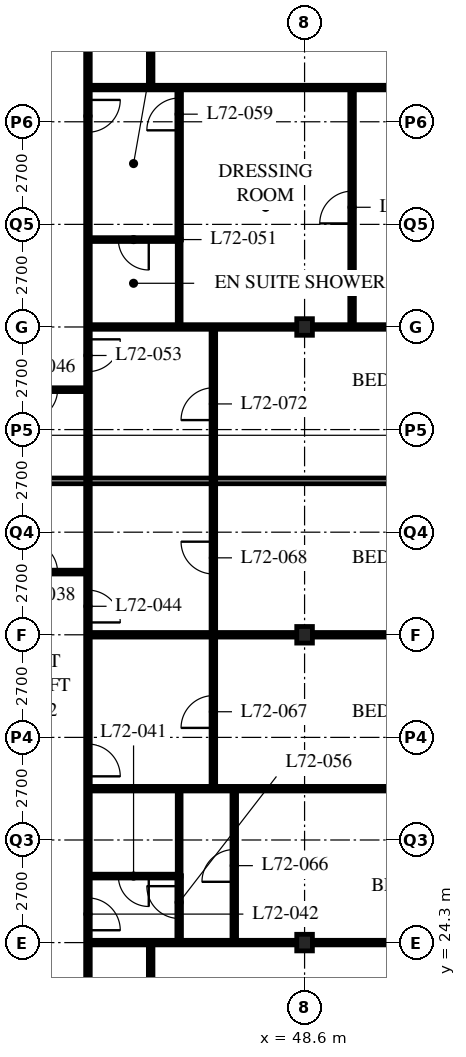
"""IFC4 building model, lengths in metres.
Left out: names, types, materials, properties, quantities, classifications, styles, units other than length and angle.
Written with IfcOpenShell. Run it as: python <this file> out.ifc"""

import sys

from ifc_helpers import new_model, si_unit, direction, frame, frame_2d, origin, origin_2d, place, context, subcontext, project, spatial, rectangle, i_section, extrude, element, fill, save


model = new_model("IFC4")
c1 = context("Model", 3, precision=1e-05, world=origin(), true_north=direction((0.0, 1.0)))
c2 = subcontext(c1, "Body", "Model", "MODEL_VIEW")
j1 = project(units=[si_unit("LENGTHUNIT", "METRE"), si_unit("PLANEANGLEUNIT", "RADIAN")], contexts=[c1])
p1 = place(None, origin())
s1 = spatial("IfcSite", under=j1, at=p1, CompositionType="ELEMENT")
p2 = place(p1, origin())
s2 = spatial("IfcBuilding", under=s1, at=p2, CompositionType="ELEMENT")
p3 = place(p2, frame((0.0, 0.0, 281.4)))
s3 = spatial("IfcBuildingStorey", under=s2, at=p3, CompositionType="ELEMENT", Elevation=281.4)
for number, where, z_axis, x_axis in (
    (1, (48.6, 24.3, 0.0), (0.0, 0.0, 1.0), (1.0, 0.0, 0.0)),
    (2, (48.6, 32.4, 0.0), (0.0, 0.0, 1.0), (1.0, 0.0, 0.0)),
    (3, (48.6, 40.5, 0.0), (0.0, 0.0, 1.0), (1.0, 0.0, 0.0)),
):
    element("IfcColumn", number, at=place(p3, frame(where, z_axis=z_axis, x_axis=x_axis)), inside=s3, PredefinedType="COLUMN", context=c2, shape_type="SweptSolid", body=[
        extrude(i_section(OverallWidth=0.412, OverallDepth=0.437, WebThickness=0.036, FlangeThickness=0.058, FilletRadius=0.015, at=origin_2d()), origin(), (0.0, 0.0, 1.0), 3.9),
    ])
p4 = place(p3, frame((40.5, 34.05, 0.0), z_axis=(0.0, 0.0, 1.0), x_axis=(1.0, 0.0, 0.0)))
e4 = element("IfcWall", 4, at=p4, inside=s3, PredefinedType="PARTITIONING", context=c2, shape_type="SweptSolid", body=[
    extrude(rectangle(XDim=2.4, YDim=0.1, at=frame_2d((1.2, 0.0))), origin(), (0.0, 0.0, 1.0), 3.69),
])
p5 = place(p4, frame((0.8, 0.0, 0.0)))
e5 = element("IfcOpeningElement", 5, at=p5, cuts=e4, PredefinedType="OPENING", context=c2, shape_type="SweptSolid", body=[
    extrude(rectangle(XDim=0.8, YDim=2.1, at=frame_2d((0.4, 1.05))), frame((0.0, 0.06, 0.0), z_axis=(0.0, -1.0, 0.0), x_axis=(1.0, 0.0, 0.0)), (0.0, 0.0, 1.0), 0.12),
])
p6 = place(p3, frame((42.9, 22.5, 0.0), z_axis=(0.0, 0.0, 1.0), x_axis=(0.0, 1.0, 0.0)))
e6 = element("IfcWall", 6, at=p6, inside=s3, PredefinedType="PARTITIONING", context=c2, shape_type="SweptSolid", body=[
    extrude(rectangle(XDim=13.95, YDim=0.12, at=frame_2d((6.975, 0.0))), origin(), (0.0, 0.0, 1.0), 3.69),
])
p7 = place(p6, frame((2.125, 0.0, 0.0)))
e7 = element("IfcOpeningElement", 7, at=p7, cuts=e6, PredefinedType="OPENING", context=c2, shape_type="SweptSolid", body=[
    extrude(rectangle(XDim=0.85, YDim=2.1, at=frame_2d((0.425, 1.05))), frame((0.0, 0.07, 0.0), z_axis=(0.0, -1.0, 0.0), x_axis=(1.0, 0.0, 0.0)), (0.0, 0.0, 1.0), 0.14),
])
p8 = place(p6, frame((6.175, 0.0, 0.0)))
e8 = element("IfcOpeningElement", 8, at=p8, cuts=e6, PredefinedType="OPENING", context=c2, shape_type="SweptSolid", body=[
    extrude(rectangle(XDim=0.85, YDim=2.1, at=frame_2d((0.425, 1.05))), frame((0.0, 0.07, 0.0), z_axis=(0.0, -1.0, 0.0), x_axis=(1.0, 0.0, 0.0)), (0.0, 0.0, 1.0), 0.14),
])
p9 = place(p6, frame((10.225, 0.0, 0.0)))
e9 = element("IfcOpeningElement", 9, at=p9, cuts=e6, PredefinedType="OPENING", context=c2, shape_type="SweptSolid", body=[
    extrude(rectangle(XDim=0.85, YDim=2.1, at=frame_2d((0.425, 1.05))), frame((0.0, 0.07, 0.0), z_axis=(0.0, -1.0, 0.0), x_axis=(1.0, 0.0, 0.0)), (0.0, 0.0, 1.0), 0.14),
])
p10 = place(p3, frame((42.9, 24.3, 0.0), z_axis=(0.0, 0.0, 1.0), x_axis=(1.0, 0.0, 0.0)))
e10 = element("IfcWall", 10, at=p10, inside=s3, PredefinedType="PARTITIONING", context=c2, shape_type="SweptSolid", body=[
    extrude(rectangle(XDim=9.45, YDim=0.12, at=frame_2d((4.725, 0.0))), origin(), (0.0, 0.0, 1.0), 3.078),
])
p11 = place(p3, frame((40.5, 36.45, 0.0), z_axis=(0.0, 0.0, 1.0), x_axis=(1.0, 0.0, 0.0)))
e11 = element("IfcWall", 11, at=p11, inside=s3, PredefinedType="PARTITIONING", context=c2, shape_type="SweptSolid", body=[
    extrude(rectangle(XDim=15.9, YDim=0.15, at=frame_2d((7.95, 0.0))), origin(), (0.0, 0.0, 1.0), 3.69),
])
p12 = place(p3, frame((44.55, 16.5, 0.0), z_axis=(0.0, 0.0, 1.0), x_axis=(0.0, 1.0, 0.0)))
e12 = element("IfcWall", 12, at=p12, inside=s3, PredefinedType="PARTITIONING", context=c2, shape_type="SweptSolid", body=[
    extrude(rectangle(XDim=7.8, YDim=0.12, at=frame_2d((3.9, 0.0))), origin(), (0.0, 0.0, 1.0), 3.69),
])
p13 = place(p12, frame((3.475, 0.0, 0.0)))
e13 = element("IfcOpeningElement", 13, at=p13, cuts=e12, PredefinedType="OPENING", context=c2, shape_type="SweptSolid", body=[
    extrude(rectangle(XDim=0.85, YDim=2.1, at=frame_2d((0.425, 1.05))), frame((0.0, 0.07, 0.0), z_axis=(0.0, -1.0, 0.0), x_axis=(1.0, 0.0, 0.0)), (0.0, 0.0, 1.0), 0.14),
])
p14 = place(p3, frame((42.9, 26.05, 0.0), z_axis=(0.0, 0.0, 1.0), x_axis=(1.0, 0.0, 0.0)))
e14 = element("IfcWall", 14, at=p14, inside=s3, PredefinedType="PARTITIONING", context=c2, shape_type="SweptSolid", body=[
    extrude(rectangle(XDim=2.4, YDim=0.1, at=frame_2d((1.2, 0.0))), origin(), (0.0, 0.0, 1.0), 3.69),
])
p15 = place(p14, frame((0.8, 0.0, 0.0)))
e15 = element("IfcOpeningElement", 15, at=p15, cuts=e14, PredefinedType="OPENING", context=c2, shape_type="SweptSolid", body=[
    extrude(rectangle(XDim=0.8, YDim=2.1, at=frame_2d((0.4, 1.05))), frame((0.0, 0.06, 0.0), z_axis=(0.0, -1.0, 0.0), x_axis=(1.0, 0.0, 0.0)), (0.0, 0.0, 1.0), 0.12),
])
p16 = place(p3, frame((45.3, 26.05, 0.0), z_axis=(0.0, 0.0, 1.0), x_axis=(0.0, 1.0, 0.0)))
e16 = element("IfcWall", 16, at=p16, inside=s3, PredefinedType="PARTITIONING", context=c2, shape_type="SweptSolid", body=[
    extrude(rectangle(XDim=2.3, YDim=0.1, at=frame_2d((1.15, 0.0))), origin(), (0.0, 0.0, 1.0), 3.69),
])
p17 = place(p3, frame((42.9, 28.35, 0.0), z_axis=(0.0, 0.0, 1.0), x_axis=(1.0, 0.0, 0.0)))
e17 = element("IfcWall", 17, at=p17, inside=s3, PredefinedType="PARTITIONING", context=c2, shape_type="SweptSolid", body=[
    extrude(rectangle(XDim=13.5, YDim=0.12, at=frame_2d((6.75, 0.0))), origin(), (0.0, 0.0, 1.0), 3.69),
])
p18 = place(p3, frame((42.9, 32.4, 0.0), z_axis=(0.0, 0.0, 1.0), x_axis=(1.0, 0.0, 0.0)))
e18 = element("IfcWall", 18, at=p18, inside=s3, PredefinedType="PARTITIONING", context=c2, shape_type="SweptSolid", body=[
    extrude(rectangle(XDim=13.5, YDim=0.12, at=frame_2d((6.75, 0.0))), origin(), (0.0, 0.0, 1.0), 3.078),
])
p19 = place(p3, frame((40.5, 38.85, 0.0), z_axis=(0.0, 0.0, 1.0), x_axis=(1.0, 0.0, 0.0)))
e19 = element("IfcWall", 19, at=p19, inside=s3, PredefinedType="PARTITIONING", context=c2, shape_type="SweptSolid", body=[
    extrude(rectangle(XDim=2.4, YDim=0.1, at=frame_2d((1.2, 0.0))), origin(), (0.0, 0.0, 1.0), 3.69),
])
p20 = place(p19, frame((0.8, 0.0, 0.0)))
e20 = element("IfcOpeningElement", 20, at=p20, cuts=e19, PredefinedType="OPENING", context=c2, shape_type="SweptSolid", body=[
    extrude(rectangle(XDim=0.8, YDim=2.1, at=frame_2d((0.4, 1.05))), frame((0.0, 0.06, 0.0), z_axis=(0.0, -1.0, 0.0), x_axis=(1.0, 0.0, 0.0)), (0.0, 0.0, 1.0), 0.12),
])
p21 = place(p3, frame((42.9, 48.6, 0.0), z_axis=(0.0, 0.0, 1.0), x_axis=(0.0, -1.0, 0.0)))
e21 = element("IfcWall", 21, at=p21, inside=s3, PredefinedType="PARTITIONING", context=c2, shape_type="SweptSolid", body=[
    extrude(rectangle(XDim=12.15, YDim=0.12, at=frame_2d((6.075, 0.0))), origin(), (0.0, 0.0, 1.0), 3.69),
])
p22 = place(p21, frame((2.125, 0.0, 0.0)))
e22 = element("IfcOpeningElement", 22, at=p22, cuts=e21, PredefinedType="OPENING", context=c2, shape_type="SweptSolid", body=[
    extrude(rectangle(XDim=0.85, YDim=2.1, at=frame_2d((0.425, 1.05))), frame((0.0, 0.07, 0.0), z_axis=(0.0, -1.0, 0.0), x_axis=(1.0, 0.0, 0.0)), (0.0, 0.0, 1.0), 0.14),
])
p23 = place(p21, frame((8.425, 0.0, 0.0)))
e23 = element("IfcOpeningElement", 23, at=p23, cuts=e21, PredefinedType="OPENING", context=c2, shape_type="SweptSolid", body=[
    extrude(rectangle(XDim=0.85, YDim=2.1, at=frame_2d((0.425, 1.05))), frame((0.0, 0.07, 0.0), z_axis=(0.0, -1.0, 0.0), x_axis=(1.0, 0.0, 0.0)), (0.0, 0.0, 1.0), 0.14),
])
p24 = place(p3, frame((42.9, 46.8, 0.0), z_axis=(0.0, 0.0, 1.0), x_axis=(1.0, 0.0, 0.0)))
e24 = element("IfcWall", 24, at=p24, inside=s3, PredefinedType="PARTITIONING", context=c2, shape_type="SweptSolid", body=[
    extrude(rectangle(XDim=13.5, YDim=0.12, at=frame_2d((6.75, 0.0))), origin(), (0.0, 0.0, 1.0), 3.69),
])
p25 = place(p3, frame((44.55, 64.5, 0.0), z_axis=(0.0, 0.0, 1.0), x_axis=(0.0, -1.0, 0.0)))
e25 = element("IfcWall", 25, at=p25, inside=s3, PredefinedType="PARTITIONING", context=c2, shape_type="SweptSolid", body=[
    extrude(rectangle(XDim=17.7, YDim=0.12, at=frame_2d((8.85, 0.0))), origin(), (0.0, 0.0, 1.0), 3.69),
])
p26 = place(p25, frame((12.475, 0.0, 0.0)))
e26 = element("IfcOpeningElement", 26, at=p26, cuts=e25, PredefinedType="OPENING", context=c2, shape_type="SweptSolid", body=[
    extrude(rectangle(XDim=0.85, YDim=2.1, at=frame_2d((0.425, 1.05))), frame((0.0, 0.07, 0.0), z_axis=(0.0, -1.0, 0.0), x_axis=(1.0, 0.0, 0.0)), (0.0, 0.0, 1.0), 0.14),
])
p27 = place(p25, frame((4.525, 0.0, 0.0)))
e27 = element("IfcOpeningElement", 27, at=p27, cuts=e25, PredefinedType="OPENING", context=c2, shape_type="SweptSolid", body=[
    extrude(rectangle(XDim=0.85, YDim=2.1, at=frame_2d((0.425, 1.05))), frame((0.0, 0.07, 0.0), z_axis=(0.0, -1.0, 0.0), x_axis=(1.0, 0.0, 0.0)), (0.0, 0.0, 1.0), 0.14),
])
p28 = place(p3, frame((42.9, 42.8, 0.0), z_axis=(0.0, 0.0, 1.0), x_axis=(1.0, 0.0, 0.0)))
e28 = element("IfcWall", 28, at=p28, inside=s3, PredefinedType="PARTITIONING", context=c2, shape_type="SweptSolid", body=[
    extrude(rectangle(XDim=2.4, YDim=0.1, at=frame_2d((1.2, 0.0))), origin(), (0.0, 0.0, 1.0), 3.69),
])
p29 = place(p28, frame((0.8, 0.0, 0.0)))
e29 = element("IfcOpeningElement", 29, at=p29, cuts=e28, PredefinedType="OPENING", context=c2, shape_type="SweptSolid", body=[
    extrude(rectangle(XDim=0.8, YDim=2.1, at=frame_2d((0.4, 1.05))), frame((0.0, 0.06, 0.0), z_axis=(0.0, -1.0, 0.0), x_axis=(1.0, 0.0, 0.0)), (0.0, 0.0, 1.0), 0.12),
])
p30 = place(p3, frame((45.3, 42.8, 0.0), z_axis=(0.0, 0.0, 1.0), x_axis=(0.0, -1.0, 0.0)))
e30 = element("IfcWall", 30, at=p30, inside=s3, PredefinedType="PARTITIONING", context=c2, shape_type="SweptSolid", body=[
    extrude(rectangle(XDim=2.3, YDim=0.1, at=frame_2d((1.15, 0.0))), origin(), (0.0, 0.0, 1.0), 3.69),
])
p31 = place(p3, frame((42.9, 40.5, 0.0), z_axis=(0.0, 0.0, 1.0), x_axis=(1.0, 0.0, 0.0)))
e31 = element("IfcWall", 31, at=p31, inside=s3, PredefinedType="PARTITIONING", context=c2, shape_type="SweptSolid", body=[
    extrude(rectangle(XDim=13.5, YDim=0.12, at=frame_2d((6.75, 0.0))), origin(), (0.0, 0.0, 1.0), 3.078),
])
p32 = place(p3, frame((45.3, 24.3, 0.0), z_axis=(0.0, 0.0, 1.0), x_axis=(0.0, 1.0, 0.0)))
e32 = element("IfcWall", 32, at=p32, inside=s3, PredefinedType="PARTITIONING", context=c2, shape_type="SweptSolid", body=[
    extrude(rectangle(XDim=1.76, YDim=0.12, at=frame_2d((0.88, 0.0))), origin(), (0.0, 0.0, 1.0), 3.69),
])
p33 = place(p32, frame((0.635, 0.0, 0.0)))
e33 = element("IfcOpeningElement", 33, at=p33, cuts=e32, PredefinedType="OPENING", context=c2, shape_type="SweptSolid", body=[
    extrude(rectangle(XDim=0.85, YDim=2.1, at=frame_2d((0.425, 1.05))), frame((0.0, 0.07, 0.0), z_axis=(0.0, -1.0, 0.0), x_axis=(1.0, 0.0, 0.0)), (0.0, 0.0, 1.0), 0.14),
])
p34 = place(p3, frame((45.3, 46.8, 0.0), z_axis=(0.0, 0.0, 1.0), x_axis=(0.0, -1.0, 0.0)))
e34 = element("IfcWall", 34, at=p34, inside=s3, PredefinedType="PARTITIONING", context=c2, shape_type="SweptSolid", body=[
    extrude(rectangle(XDim=4.01, YDim=0.12, at=frame_2d((2.005, 0.0))), origin(), (0.0, 0.0, 1.0), 3.69),
])
p35 = place(p34, frame((0.275, 0.0, 0.0)))
e35 = element("IfcOpeningElement", 35, at=p35, cuts=e34, PredefinedType="OPENING", context=c2, shape_type="SweptSolid", body=[
    extrude(rectangle(XDim=0.85, YDim=2.1, at=frame_2d((0.425, 1.05))), frame((0.0, 0.07, 0.0), z_axis=(0.0, -1.0, 0.0), x_axis=(1.0, 0.0, 0.0)), (0.0, 0.0, 1.0), 0.14),
])
p36 = place(p3, frame((46.75, 24.3, 0.0), z_axis=(0.0, 0.0, 1.0), x_axis=(0.0, 1.0, 0.0)))
e36 = element("IfcWall", 36, at=p36, inside=s3, PredefinedType="PARTITIONING", context=c2, shape_type="SweptSolid", body=[
    extrude(rectangle(XDim=4.05, YDim=0.12, at=frame_2d((2.025, 0.0))), origin(), (0.0, 0.0, 1.0), 3.69),
])
p37 = place(p36, frame((1.6, 0.0, 0.0)))
e37 = element("IfcOpeningElement", 37, at=p37, cuts=e36, PredefinedType="OPENING", context=c2, shape_type="SweptSolid", body=[
    extrude(rectangle(XDim=0.85, YDim=2.1, at=frame_2d((0.425, 1.05))), frame((0.0, 0.07, 0.0), z_axis=(0.0, -1.0, 0.0), x_axis=(1.0, 0.0, 0.0)), (0.0, 0.0, 1.0), 0.14),
])
p38 = place(p3, frame((46.2, 28.35, 0.0), z_axis=(0.0, 0.0, 1.0), x_axis=(0.0, 1.0, 0.0)))
e38 = element("IfcWall", 38, at=p38, inside=s3, PredefinedType="PARTITIONING", context=c2, shape_type="SweptSolid", body=[
    extrude(rectangle(XDim=12.15, YDim=0.12, at=frame_2d((6.075, 0.0))), origin(), (0.0, 0.0, 1.0), 3.69),
])
p39 = place(p38, frame((1.6, 0.0, 0.0)))
e39 = element("IfcOpeningElement", 39, at=p39, cuts=e38, PredefinedType="OPENING", context=c2, shape_type="SweptSolid", body=[
    extrude(rectangle(XDim=0.85, YDim=2.1, at=frame_2d((0.425, 1.05))), frame((0.0, 0.07, 0.0), z_axis=(0.0, -1.0, 0.0), x_axis=(1.0, 0.0, 0.0)), (0.0, 0.0, 1.0), 0.14),
])
p40 = place(p38, frame((5.65, 0.0, 0.0)))
e40 = element("IfcOpeningElement", 40, at=p40, cuts=e38, PredefinedType="OPENING", context=c2, shape_type="SweptSolid", body=[
    extrude(rectangle(XDim=0.85, YDim=2.1, at=frame_2d((0.425, 1.05))), frame((0.0, 0.07, 0.0), z_axis=(0.0, -1.0, 0.0), x_axis=(1.0, 0.0, 0.0)), (0.0, 0.0, 1.0), 0.14),
])
p41 = place(p38, frame((9.7, 0.0, 0.0)))
e41 = element("IfcOpeningElement", 41, at=p41, cuts=e38, PredefinedType="OPENING", context=c2, shape_type="SweptSolid", body=[
    extrude(rectangle(XDim=0.85, YDim=2.1, at=frame_2d((0.425, 1.05))), frame((0.0, 0.07, 0.0), z_axis=(0.0, -1.0, 0.0), x_axis=(1.0, 0.0, 0.0)), (0.0, 0.0, 1.0), 0.14),
])
p42 = place(p3, frame((49.85, 40.5, 0.0), z_axis=(0.0, 0.0, 1.0), x_axis=(0.0, 1.0, 0.0)))
e42 = element("IfcWall", 42, at=p42, inside=s3, PredefinedType="PARTITIONING", context=c2, shape_type="SweptSolid", body=[
    extrude(rectangle(XDim=6.3, YDim=0.12, at=frame_2d((3.15, 0.0))), origin(), (0.0, 0.0, 1.0), 3.69),
])
p43 = place(p42, frame((2.725, 0.0, 0.0)))
e43 = element("IfcOpeningElement", 43, at=p43, cuts=e42, PredefinedType="OPENING", context=c2, shape_type="SweptSolid", body=[
    extrude(rectangle(XDim=0.85, YDim=2.1, at=frame_2d((0.425, 1.05))), frame((0.0, 0.07, 0.0), z_axis=(0.0, -1.0, 0.0), x_axis=(1.0, 0.0, 0.0)), (0.0, 0.0, 1.0), 0.14),
])
p44 = place(p5, origin())
e44 = element("IfcDoor", 44, at=p44, inside=s3, OperationType="SINGLE_SWING_LEFT", PredefinedType="DOOR", context=c2, shape_type="SweptSolid", body=[
    extrude(rectangle(XDim=0.8, YDim=2.1, at=frame_2d((0.4, 1.05))), frame((0.0, 0.025, 0.0), z_axis=(0.0, -1.0, 0.0), x_axis=(1.0, 0.0, 0.0)), (0.0, 0.0, 1.0), 0.05),
])
fill(e5, e44)
p45 = place(p15, origin())
e45 = element("IfcDoor", 45, at=p45, inside=s3, OperationType="SINGLE_SWING_LEFT", PredefinedType="DOOR", context=c2, shape_type="SweptSolid", body=[
    extrude(rectangle(XDim=0.8, YDim=2.1, at=frame_2d((0.4, 1.05))), frame((0.0, 0.025, 0.0), z_axis=(0.0, -1.0, 0.0), x_axis=(1.0, 0.0, 0.0)), (0.0, 0.0, 1.0), 0.05),
])
fill(e15, e45)
p46 = place(p7, origin())
e46 = element("IfcDoor", 46, at=p46, inside=s3, OperationType="SINGLE_SWING_RIGHT", PredefinedType="DOOR", context=c2, shape_type="SweptSolid", body=[
    extrude(rectangle(XDim=0.85, YDim=2.1, at=frame_2d((0.425, 1.05))), frame((0.0, 0.025, 0.0), z_axis=(0.0, -1.0, 0.0), x_axis=(1.0, 0.0, 0.0)), (0.0, 0.0, 1.0), 0.05),
])
fill(e7, e46)
p47 = place(p8, origin())
e47 = element("IfcDoor", 47, at=p47, inside=s3, OperationType="SINGLE_SWING_RIGHT", PredefinedType="DOOR", context=c2, shape_type="SweptSolid", body=[
    extrude(rectangle(XDim=0.85, YDim=2.1, at=frame_2d((0.425, 1.05))), frame((0.0, 0.025, 0.0), z_axis=(0.0, -1.0, 0.0), x_axis=(1.0, 0.0, 0.0)), (0.0, 0.0, 1.0), 0.05),
])
fill(e8, e47)
p48 = place(p9, origin())
e48 = element("IfcDoor", 48, at=p48, inside=s3, OperationType="SINGLE_SWING_RIGHT", PredefinedType="DOOR", context=c2, shape_type="SweptSolid", body=[
    extrude(rectangle(XDim=0.85, YDim=2.1, at=frame_2d((0.425, 1.05))), frame((0.0, 0.025, 0.0), z_axis=(0.0, -1.0, 0.0), x_axis=(1.0, 0.0, 0.0)), (0.0, 0.0, 1.0), 0.05),
])
fill(e9, e48)
p49 = place(p20, origin())
e49 = element("IfcDoor", 49, at=p49, inside=s3, OperationType="SINGLE_SWING_RIGHT", PredefinedType="DOOR", context=c2, shape_type="SweptSolid", body=[
    extrude(rectangle(XDim=0.8, YDim=2.1, at=frame_2d((0.4, 1.05))), frame((0.0, 0.025, 0.0), z_axis=(0.0, -1.0, 0.0), x_axis=(1.0, 0.0, 0.0)), (0.0, 0.0, 1.0), 0.05),
])
fill(e20, e49)
p50 = place(p29, origin())
e50 = element("IfcDoor", 50, at=p50, inside=s3, OperationType="SINGLE_SWING_LEFT", PredefinedType="DOOR", context=c2, shape_type="SweptSolid", body=[
    extrude(rectangle(XDim=0.8, YDim=2.1, at=frame_2d((0.4, 1.05))), frame((0.0, 0.025, 0.0), z_axis=(0.0, -1.0, 0.0), x_axis=(1.0, 0.0, 0.0)), (0.0, 0.0, 1.0), 0.05),
])
fill(e29, e50)
p51 = place(p22, origin())
e51 = element("IfcDoor", 51, at=p51, inside=s3, OperationType="SINGLE_SWING_LEFT", PredefinedType="DOOR", context=c2, shape_type="SweptSolid", body=[
    extrude(rectangle(XDim=0.85, YDim=2.1, at=frame_2d((0.425, 1.05))), frame((0.0, 0.025, 0.0), z_axis=(0.0, -1.0, 0.0), x_axis=(1.0, 0.0, 0.0)), (0.0, 0.0, 1.0), 0.05),
])
fill(e22, e51)
p52 = place(p23, origin())
e52 = element("IfcDoor", 52, at=p52, inside=s3, OperationType="SINGLE_SWING_LEFT", PredefinedType="DOOR", context=c2, shape_type="SweptSolid", body=[
    extrude(rectangle(XDim=0.85, YDim=2.1, at=frame_2d((0.425, 1.05))), frame((0.0, 0.025, 0.0), z_axis=(0.0, -1.0, 0.0), x_axis=(1.0, 0.0, 0.0)), (0.0, 0.0, 1.0), 0.05),
])
fill(e23, e52)
p53 = place(p33, origin())
e53 = element("IfcDoor", 53, at=p53, inside=s3, OperationType="SINGLE_SWING_RIGHT", PredefinedType="DOOR", context=c2, shape_type="SweptSolid", body=[
    extrude(rectangle(XDim=0.85, YDim=2.1, at=frame_2d((0.425, 1.05))), frame((0.0, 0.025, 0.0), z_axis=(0.0, -1.0, 0.0), x_axis=(1.0, 0.0, 0.0)), (0.0, 0.0, 1.0), 0.05),
])
fill(e33, e53)
p54 = place(p35, origin())
e54 = element("IfcDoor", 54, at=p54, inside=s3, OperationType="SINGLE_SWING_LEFT", PredefinedType="DOOR", context=c2, shape_type="SweptSolid", body=[
    extrude(rectangle(XDim=0.85, YDim=2.1, at=frame_2d((0.425, 1.05))), frame((0.0, 0.025, 0.0), z_axis=(0.0, -1.0, 0.0), x_axis=(1.0, 0.0, 0.0)), (0.0, 0.0, 1.0), 0.05),
])
fill(e35, e54)
p55 = place(p37, origin())
e55 = element("IfcDoor", 55, at=p55, inside=s3, OperationType="SINGLE_SWING_LEFT", PredefinedType="DOOR", context=c2, shape_type="SweptSolid", body=[
    extrude(rectangle(XDim=0.85, YDim=2.1, at=frame_2d((0.425, 1.05))), frame((0.0, 0.025, 0.0), z_axis=(0.0, -1.0, 0.0), x_axis=(1.0, 0.0, 0.0)), (0.0, 0.0, 1.0), 0.05),
])
fill(e37, e55)
p56 = place(p39, origin())
e56 = element("IfcDoor", 56, at=p56, inside=s3, OperationType="SINGLE_SWING_LEFT", PredefinedType="DOOR", context=c2, shape_type="SweptSolid", body=[
    extrude(rectangle(XDim=0.85, YDim=2.1, at=frame_2d((0.425, 1.05))), frame((0.0, 0.025, 0.0), z_axis=(0.0, -1.0, 0.0), x_axis=(1.0, 0.0, 0.0)), (0.0, 0.0, 1.0), 0.05),
])
fill(e39, e56)
p57 = place(p40, origin())
e57 = element("IfcDoor", 57, at=p57, inside=s3, OperationType="SINGLE_SWING_RIGHT", PredefinedType="DOOR", context=c2, shape_type="SweptSolid", body=[
    extrude(rectangle(XDim=0.85, YDim=2.1, at=frame_2d((0.425, 1.05))), frame((0.0, 0.025, 0.0), z_axis=(0.0, -1.0, 0.0), x_axis=(1.0, 0.0, 0.0)), (0.0, 0.0, 1.0), 0.05),
])
fill(e40, e57)
p58 = place(p43, origin())
e58 = element("IfcDoor", 58, at=p58, inside=s3, OperationType="SINGLE_SWING_LEFT", PredefinedType="DOOR", context=c2, shape_type="SweptSolid", body=[
    extrude(rectangle(XDim=0.85, YDim=2.1, at=frame_2d((0.425, 1.05))), frame((0.0, 0.025, 0.0), z_axis=(0.0, -1.0, 0.0), x_axis=(1.0, 0.0, 0.0)), (0.0, 0.0, 1.0), 0.05),
])
fill(e43, e58)
p59 = place(p41, origin())
e59 = element("IfcDoor", 59, at=p59, inside=s3, OperationType="SINGLE_SWING_LEFT", PredefinedType="DOOR", context=c2, shape_type="SweptSolid", body=[
    extrude(rectangle(XDim=0.85, YDim=2.1, at=frame_2d((0.425, 1.05))), frame((0.0, 0.025, 0.0), z_axis=(0.0, -1.0, 0.0), x_axis=(1.0, 0.0, 0.0)), (0.0, 0.0, 1.0), 0.05),
])
fill(e41, e59)
save(model, sys.argv[1])
